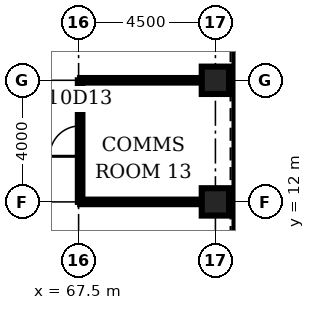
"""IFC4 building model, lengths in metres.
Left out: names, types, materials, properties, quantities, classifications, styles, units other than length and angle.
Written with IfcOpenShell. Run it as: python <this file> out.ifc"""

import sys

from ifc_helpers import new_model, si_unit, direction, frame, frame_2d, origin, origin_2d, place, context, subcontext, project, spatial, rectangle, hollow_rectangle, extrude, element, fill, save


model = new_model("IFC4")
c1 = context("Model", 3, precision=1e-05, world=origin(), true_north=direction((0.0, 1.0)))
c2 = subcontext(c1, "Body", "Model", "MODEL_VIEW")
j1 = project(units=[si_unit("LENGTHUNIT", "METRE"), si_unit("PLANEANGLEUNIT", "RADIAN")], contexts=[c1])
p1 = place(None, origin())
s1 = spatial("IfcSite", under=j1, at=p1, CompositionType="ELEMENT")
p2 = place(p1, origin())
s2 = spatial("IfcBuilding", under=s1, at=p2, CompositionType="ELEMENT")
p3 = place(p2, frame((0.0, 0.0, 50.0)))
s3 = spatial("IfcBuildingStorey", under=s2, at=p3, CompositionType="ELEMENT", Elevation=50.0)
for number, where, z_axis, x_axis in (
    (1, (72.0, 12.0, 0.0), (0.0, 0.0, 1.0), (1.0, 0.0, 0.0)),
    (2, (72.0, 16.0, 0.0), (0.0, 0.0, 1.0), (1.0, 0.0, 0.0)),
):
    element("IfcColumn", number, at=place(p3, frame(where, z_axis=z_axis, x_axis=x_axis)), inside=s3, PredefinedType="COLUMN", context=c2, shape_type="SweptSolid", body=[
        extrude(hollow_rectangle(XDim=0.9, YDim=0.9, WallThickness=0.12, at=origin_2d()), origin(), (0.0, 0.0, 1.0), 4.5),
    ])
for number, where, z_axis, x_axis in (
    (3, (67.55, 12.0, 0.0), (0.0, 0.0, 1.0), (1.0, 0.0, 0.0)),
    (4, (67.55, 16.0, 0.0), (0.0, 0.0, 1.0), (1.0, 0.0, 0.0)),
):
    element("IfcWall", number, at=place(p3, frame(where, z_axis=z_axis, x_axis=x_axis)), inside=s3, PredefinedType="PARTITIONING", context=c2, shape_type="SweptSolid", body=[
        extrude(rectangle(XDim=4.0, YDim=0.15, at=frame_2d((2.0, 0.0))), origin(), (0.0, 0.0, 1.0), 3.0),
    ])
p4 = place(p3, frame((67.55, 12.0, 0.0), z_axis=(0.0, 0.0, 1.0), x_axis=(0.0, 1.0, 0.0)))
e5 = element("IfcWall", 5, at=p4, inside=s3, PredefinedType="PARTITIONING", context=c2, shape_type="SweptSolid", body=[
    extrude(rectangle(XDim=4.0, YDim=0.15, at=frame_2d((2.0, 0.0))), origin(), (0.0, 0.0, 1.0), 3.0),
])
p5 = place(p4, frame((1.5, 0.0, 0.0)))
e6 = element("IfcOpeningElement", 6, at=p5, cuts=e5, PredefinedType="OPENING", context=c2, shape_type="SweptSolid", body=[
    extrude(rectangle(XDim=1.0, YDim=2.1, at=frame_2d((0.5, 1.05))), frame((0.0, 0.085, 0.0), z_axis=(0.0, -1.0, 0.0), x_axis=(1.0, 0.0, 0.0)), (0.0, 0.0, 1.0), 0.17),
])
p6 = place(p5, origin())
e7 = element("IfcDoor", 7, at=p6, inside=s3, OperationType="SINGLE_SWING_LEFT", PredefinedType="DOOR", context=c2, shape_type="SweptSolid", body=[
    extrude(rectangle(XDim=1.0, YDim=2.1, at=frame_2d((0.5, 1.05))), frame((0.0, 0.025, 0.0), z_axis=(0.0, -1.0, 0.0), x_axis=(1.0, 0.0, 0.0)), (0.0, 0.0, 1.0), 0.05),
])
fill(e6, e7)
save(model, sys.argv[1])
